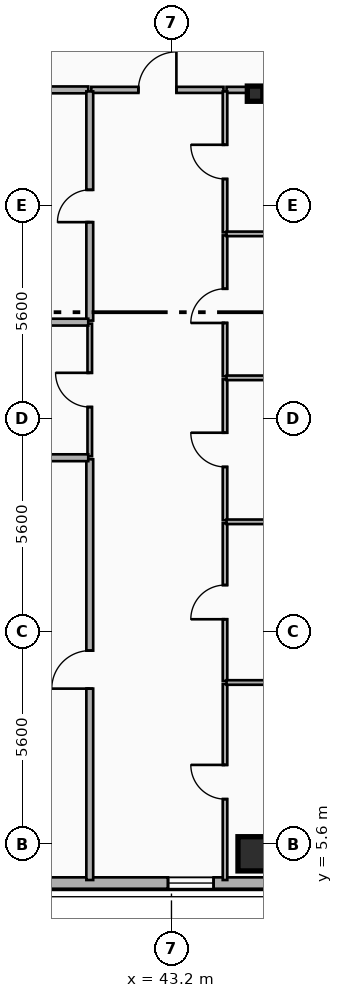
"""IFC4 building model, lengths in metres.
Left out: names, types, materials, properties, quantities, classifications, styles, units other than length and angle.
Written with IfcOpenShell. Run it as: python <this file> out.ifc"""

import sys

from ifc_helpers import new_model, si_unit, direction, frame, frame_2d, origin, origin_2d, place, context, subcontext, project, spatial, rectangle, i_section, extrude, element, fill, save


model = new_model("IFC4")
c1 = context("Model", 3, precision=1e-05, world=origin(), true_north=direction((0.0, 1.0)))
c2 = subcontext(c1, "Body", "Model", "MODEL_VIEW")
j1 = project(units=[si_unit("LENGTHUNIT", "METRE"), si_unit("PLANEANGLEUNIT", "RADIAN")], contexts=[c1])
p1 = place(None, origin())
s1 = spatial("IfcSite", under=j1, at=p1, CompositionType="ELEMENT")
p2 = place(p1, origin())
s2 = spatial("IfcBuilding", under=s1, at=p2, CompositionType="ELEMENT")
p3 = place(p2, frame((0.0, 0.0, 229.2)))
s3 = spatial("IfcBuildingStorey", under=s2, at=p3, CompositionType="ELEMENT", Elevation=229.2)
p4 = place(p3, frame((45.4, 25.35, 0.0), z_axis=(0.0, 0.0, 1.0), x_axis=(1.0, 0.0, 0.0)))
e1 = element("IfcColumn", 1, at=p4, inside=s3, PredefinedType="COLUMN", context=c2, shape_type="SweptSolid", body=[
    extrude(i_section(OverallWidth=0.408, OverallDepth=0.4, WebThickness=0.025, FlangeThickness=0.039, FilletRadius=0.015, at=origin_2d()), origin(), (0.0, 0.0, 1.0), 3.6),
])
p5 = place(p3, frame((45.4, 5.458, 0.0), z_axis=(0.0, -0.090298253426, 0.995914768154), x_axis=(1.0, 0.0, 0.0)))
e2 = element("IfcColumn", 2, at=p5, inside=s3, PredefinedType="COLUMN", context=c2, shape_type="SweptSolid", body=[
    extrude(rectangle(XDim=0.9, YDim=0.9, at=origin_2d()), origin(), (0.0, 0.0, 1.0), 3.615),
])
p6 = place(p3, frame((48.0, 4.58, 0.0), z_axis=(0.0, 0.0, 1.0), x_axis=(-1.0, 0.0, 0.0)))
e3 = element("IfcWall", 3, at=p6, inside=s3, PredefinedType="SOLIDWALL", context=c2, shape_type="SweptSolid", body=[
    extrude(rectangle(XDim=38.4, YDim=0.3, at=frame_2d((19.2, 0.0))), origin(), (0.0, 0.0, 1.0), 3.34),
])
p7 = place(p6, frame((33.902, 0.0, 1.05)))
e4 = element("IfcOpeningElement", 4, at=p7, cuts=e3, PredefinedType="OPENING", context=c2, shape_type="SweptSolid", body=[
    extrude(rectangle(XDim=1.2, YDim=1.5, at=frame_2d((0.6, 0.75))), frame((0.0, 0.16, 0.0), z_axis=(0.0, -1.0, 0.0), x_axis=(1.0, 0.0, 0.0)), (0.0, 0.0, 1.0), 0.32),
])
p8 = place(p6, frame((29.45, 0.0, 0.48)))
e5 = element("IfcOpeningElement", 5, at=p8, cuts=e3, PredefinedType="OPENING", context=c2, shape_type="SweptSolid", body=[
    extrude(rectangle(XDim=1.1, YDim=1.05, at=frame_2d((0.55, 0.525))), frame((0.0, 0.16, 0.0), z_axis=(0.0, -1.0, 0.0), x_axis=(1.0, 0.0, 0.0)), (0.0, 0.0, 1.0), 0.32),
])
p9 = place(p6, frame((36.589, 0.0, 0.75)))
e6 = element("IfcOpeningElement", 6, at=p9, cuts=e3, PredefinedType="OPENING", context=c2, shape_type="SweptSolid", body=[
    extrude(rectangle(XDim=1.4, YDim=1.8, at=frame_2d((0.7, 0.9))), frame((0.0, 0.16, 0.0), z_axis=(0.0, -1.0, 0.0), x_axis=(1.0, 0.0, 0.0)), (0.0, 0.0, 1.0), 0.32),
])
p10 = place(p6, frame((15.576, 0.0, 0.65)))
e7 = element("IfcOpeningElement", 7, at=p10, cuts=e3, PredefinedType="OPENING", context=c2, shape_type="SweptSolid", body=[
    extrude(rectangle(XDim=2.0, YDim=2.2, at=frame_2d((1.0, 1.1))), frame((0.0, 0.16, 0.0), z_axis=(0.0, -1.0, 0.0), x_axis=(1.0, 0.0, 0.0)), (0.0, 0.0, 1.0), 0.32),
])
p11 = place(p6, frame((22.776, 0.0, 0.65)))
e8 = element("IfcOpeningElement", 8, at=p11, cuts=e3, PredefinedType="OPENING", context=c2, shape_type="SweptSolid", body=[
    extrude(rectangle(XDim=2.0, YDim=2.2, at=frame_2d((1.0, 1.1))), frame((0.0, 0.16, 0.0), z_axis=(0.0, -1.0, 0.0), x_axis=(1.0, 0.0, 0.0)), (0.0, 0.0, 1.0), 0.32),
])
p12 = place(p6, frame((12.399, 0.0, 0.75)))
e9 = element("IfcOpeningElement", 9, at=p12, cuts=e3, PredefinedType="OPENING", context=c2, shape_type="SweptSolid", body=[
    extrude(rectangle(XDim=1.6, YDim=1.95, at=frame_2d((0.8, 0.975))), frame((0.0, 0.16, 0.0), z_axis=(0.0, -1.0, 0.0), x_axis=(1.0, 0.0, 0.0)), (0.0, 0.0, 1.0), 0.32),
])
p13 = place(p6, frame((3.691, 0.0, 0.48)))
e10 = element("IfcOpeningElement", 10, at=p13, cuts=e3, PredefinedType="OPENING", context=c2, shape_type="SweptSolid", body=[
    extrude(rectangle(XDim=1.2, YDim=1.5, at=frame_2d((0.6, 0.75))), frame((0.0, 0.16, 0.0), z_axis=(0.0, -1.0, 0.0), x_axis=(1.0, 0.0, 0.0)), (0.0, 0.0, 1.0), 0.32),
])
p14 = place(p6, frame((8.25, 0.0, 1.68)))
e11 = element("IfcOpeningElement", 11, at=p14, cuts=e3, PredefinedType="OPENING", context=c2, shape_type="SweptSolid", body=[
    extrude(rectangle(XDim=1.1, YDim=1.05, at=frame_2d((0.55, 0.525))), frame((0.0, 0.16, 0.0), z_axis=(0.0, -1.0, 0.0), x_axis=(1.0, 0.0, 0.0)), (0.0, 0.0, 1.0), 0.32),
])
p15 = place(p6, frame((0.411, 0.0, 0.75)))
e12 = element("IfcOpeningElement", 12, at=p15, cuts=e3, PredefinedType="OPENING", context=c2, shape_type="SweptSolid", body=[
    extrude(rectangle(XDim=1.4, YDim=1.8, at=frame_2d((0.7, 0.9))), frame((0.0, 0.16, 0.0), z_axis=(0.0, -1.0, 0.0), x_axis=(1.0, 0.0, 0.0)), (0.0, 0.0, 1.0), 0.32),
])
p16 = place(p3, frame((41.09, 25.45, 0.0), z_axis=(0.0, 0.0, 1.0), x_axis=(1.0, 0.0, 0.0)))
e13 = element("IfcWall", 13, at=p16, inside=s3, PredefinedType="PARTITIONING", context=c2, shape_type="SweptSolid", body=[
    extrude(rectangle(XDim=3.479, YDim=0.16, at=frame_2d((1.74, 0.0))), origin(), (0.0, 0.0, 1.0), 3.34),
])
p17 = place(p16, frame((1.24, 0.0, 0.0)))
e14 = element("IfcOpeningElement", 14, at=p17, cuts=e13, PredefinedType="OPENING", context=c2, shape_type="SweptSolid", body=[
    extrude(rectangle(XDim=1.0, YDim=2.15, at=frame_2d((0.5, 1.075))), frame((0.0, 0.09, 0.0), z_axis=(0.0, -1.0, 0.0), x_axis=(1.0, 0.0, 0.0)), (0.0, 0.0, 1.0), 0.18),
])
p18 = place(p3, frame((38.39, 25.45, 0.0), z_axis=(0.0, 0.0, 1.0), x_axis=(1.0, 0.0, 0.0)))
e15 = element("IfcWall", 15, at=p18, inside=s3, PredefinedType="PLUMBINGWALL", context=c2, shape_type="SweptSolid", body=[
    extrude(rectangle(XDim=2.62, YDim=0.18, at=frame_2d((1.31, 0.0))), origin(), (0.0, 0.0, 1.0), 3.34),
])
p19 = place(p3, frame((44.649, 25.45, 0.0), z_axis=(0.0, 0.0, 1.0), x_axis=(1.0, 0.0, 0.0)))
e16 = element("IfcWall", 16, at=p19, inside=s3, PredefinedType="PARTITIONING", context=c2, shape_type="SweptSolid", body=[
    extrude(rectangle(XDim=7.291, YDim=0.16, at=frame_2d((3.646, 0.0))), origin(), (0.0, 0.0, 1.0), 2.52),
])
p20 = place(p3, frame((41.05, 4.66, 0.0), z_axis=(0.0, 0.0, 1.0), x_axis=(0.0, 1.0, 0.0)))
e17 = element("IfcWall", 17, at=p20, inside=s3, PredefinedType="PLUMBINGWALL", context=c2, shape_type="SweptSolid", body=[
    extrude(rectangle(XDim=11.071, YDim=0.18, at=frame_2d((5.536, 0.0))), origin(), (0.0, 0.0, 1.0), 2.92),
])
p21 = place(p20, frame((5.035, 0.0, 0.0)))
e18 = element("IfcOpeningElement", 18, at=p21, cuts=e17, PredefinedType="OPENING", context=c2, shape_type="SweptSolid", body=[
    extrude(rectangle(XDim=1.0, YDim=2.15, at=frame_2d((0.5, 1.075))), frame((0.0, 0.1, 0.0), z_axis=(0.0, -1.0, 0.0), x_axis=(1.0, 0.0, 0.0)), (0.0, 0.0, 1.0), 0.2),
])
p22 = place(p3, frame((41.05, 15.811, 0.0), z_axis=(0.0, 0.0, 1.0), x_axis=(0.0, 1.0, 0.0)))
e19 = element("IfcWall", 19, at=p22, inside=s3, PredefinedType="PARTITIONING", context=c2, shape_type="SweptSolid", body=[
    extrude(rectangle(XDim=3.488, YDim=0.12, at=frame_2d((1.744, 0.0))), origin(), (0.0, 0.0, 1.0), 2.92),
])
p23 = place(p22, frame((1.294, 0.0, 0.0)))
e20 = element("IfcOpeningElement", 20, at=p23, cuts=e19, PredefinedType="OPENING", context=c2, shape_type="SweptSolid", body=[
    extrude(rectangle(XDim=0.9, YDim=2.1, at=frame_2d((0.45, 1.05))), frame((0.0, 0.07, 0.0), z_axis=(0.0, -1.0, 0.0), x_axis=(1.0, 0.0, 0.0)), (0.0, 0.0, 1.0), 0.14),
])
p24 = place(p3, frame((41.05, 19.379, 0.0), z_axis=(0.0, 0.0, 1.0), x_axis=(0.0, 1.0, 0.0)))
e21 = element("IfcWall", 21, at=p24, inside=s3, PredefinedType="PLUMBINGWALL", context=c2, shape_type="SweptSolid", body=[
    extrude(rectangle(XDim=6.031, YDim=0.18, at=frame_2d((3.016, 0.0))), origin(), (0.0, 0.0, 1.0), 2.92),
])
p25 = place(p24, frame((2.591, 0.0, 0.0)))
e22 = element("IfcOpeningElement", 22, at=p25, cuts=e21, PredefinedType="OPENING", context=c2, shape_type="SweptSolid", body=[
    extrude(rectangle(XDim=0.85, YDim=2.1, at=frame_2d((0.425, 1.05))), frame((0.0, 0.1, 0.0), z_axis=(0.0, -1.0, 0.0), x_axis=(1.0, 0.0, 0.0)), (0.0, 0.0, 1.0), 0.2),
])
p26 = place(p3, frame((44.609, 4.66, 0.0), z_axis=(0.0, 0.0, 1.0), x_axis=(0.0, 1.0, 0.0)))
e23 = element("IfcWall", 23, at=p26, inside=s3, PredefinedType="PARTITIONING", context=c2, shape_type="SweptSolid", body=[
    extrude(rectangle(XDim=5.157, YDim=0.12, at=frame_2d((2.579, 0.0))), origin(), (0.0, 0.0, 1.0), 2.92),
])
p27 = place(p26, frame((2.128, 0.0, 0.0)))
e24 = element("IfcOpeningElement", 24, at=p27, cuts=e23, PredefinedType="OPENING", context=c2, shape_type="SweptSolid", body=[
    extrude(rectangle(XDim=0.9, YDim=2.1, at=frame_2d((0.45, 1.05))), frame((0.0, 0.07, 0.0), z_axis=(0.0, -1.0, 0.0), x_axis=(1.0, 0.0, 0.0)), (0.0, 0.0, 1.0), 0.14),
])
p28 = place(p3, frame((44.609, 9.897, 0.0), z_axis=(0.0, 0.0, 1.0), x_axis=(0.0, 1.0, 0.0)))
e25 = element("IfcWall", 25, at=p28, inside=s3, PredefinedType="PARTITIONING", context=c2, shape_type="SweptSolid", body=[
    extrude(rectangle(XDim=4.148, YDim=0.12, at=frame_2d((2.074, 0.0))), origin(), (0.0, 0.0, 1.0), 2.93),
])
p29 = place(p28, frame((1.624, 0.0, 0.0)))
e26 = element("IfcOpeningElement", 26, at=p29, cuts=e25, PredefinedType="OPENING", context=c2, shape_type="SweptSolid", body=[
    extrude(rectangle(XDim=0.9, YDim=2.1, at=frame_2d((0.45, 1.05))), frame((0.0, 0.07, 0.0), z_axis=(0.0, -1.0, 0.0), x_axis=(1.0, 0.0, 0.0)), (0.0, 0.0, 1.0), 0.14),
])
p30 = place(p3, frame((44.609, 14.125, 0.0), z_axis=(0.0, 0.0, 1.0), x_axis=(0.0, 1.0, 0.0)))
e27 = element("IfcWall", 27, at=p30, inside=s3, PredefinedType="PARTITIONING", context=c2, shape_type="SweptSolid", body=[
    extrude(rectangle(XDim=3.708, YDim=0.12, at=frame_2d((1.854, 0.0))), origin(), (0.0, 0.0, 1.0), 2.92),
])
p31 = place(p30, frame((1.404, 0.0, 0.0)))
e28 = element("IfcOpeningElement", 28, at=p31, cuts=e27, PredefinedType="OPENING", context=c2, shape_type="SweptSolid", body=[
    extrude(rectangle(XDim=0.9, YDim=2.1, at=frame_2d((0.45, 1.05))), frame((0.0, 0.07, 0.0), z_axis=(0.0, -1.0, 0.0), x_axis=(1.0, 0.0, 0.0)), (0.0, 0.0, 1.0), 0.14),
])
p32 = place(p3, frame((44.609, 17.913, 0.0), z_axis=(0.0, 0.0, 1.0), x_axis=(0.0, 1.0, 0.0)))
e29 = element("IfcWall", 29, at=p32, inside=s3, PredefinedType="PARTITIONING", context=c2, shape_type="SweptSolid", body=[
    extrude(rectangle(XDim=3.708, YDim=0.12, at=frame_2d((1.854, 0.0))), origin(), (0.0, 0.0, 1.0), 2.93),
])
p33 = place(p32, frame((1.404, 0.0, 0.0)))
e30 = element("IfcOpeningElement", 30, at=p33, cuts=e29, PredefinedType="OPENING", context=c2, shape_type="SweptSolid", body=[
    extrude(rectangle(XDim=0.9, YDim=2.1, at=frame_2d((0.45, 1.05))), frame((0.0, 0.07, 0.0), z_axis=(0.0, -1.0, 0.0), x_axis=(1.0, 0.0, 0.0)), (0.0, 0.0, 1.0), 0.14),
])
p34 = place(p3, frame((44.609, 21.701, 0.0), z_axis=(0.0, 0.0, 1.0), x_axis=(0.0, 1.0, 0.0)))
e31 = element("IfcWall", 31, at=p34, inside=s3, PredefinedType="PARTITIONING", context=c2, shape_type="SweptSolid", body=[
    extrude(rectangle(XDim=3.709, YDim=0.12, at=frame_2d((1.854, 0.0))), origin(), (0.0, 0.0, 1.0), 2.92),
])
p35 = place(p34, frame((1.405, 0.0, 0.0)))
e32 = element("IfcOpeningElement", 32, at=p35, cuts=e31, PredefinedType="OPENING", context=c2, shape_type="SweptSolid", body=[
    extrude(rectangle(XDim=0.9, YDim=2.1, at=frame_2d((0.45, 1.05))), frame((0.0, 0.07, 0.0), z_axis=(0.0, -1.0, 0.0), x_axis=(1.0, 0.0, 0.0)), (0.0, 0.0, 1.0), 0.14),
])
p36 = place(p3, frame((38.39, 15.771, 0.0), z_axis=(0.0, 0.0, 1.0), x_axis=(1.0, 0.0, 0.0)))
e33 = element("IfcWall", 33, at=p36, inside=s3, PredefinedType="PLUMBINGWALL", context=c2, shape_type="SweptSolid", body=[
    extrude(rectangle(XDim=2.62, YDim=0.18, at=frame_2d((1.31, 0.0))), origin(), (0.0, 0.0, 1.0), 2.92),
])
p37 = place(p3, frame((38.39, 19.339, 0.0), z_axis=(0.0, 0.0, 1.0), x_axis=(1.0, 0.0, 0.0)))
e34 = element("IfcWall", 34, at=p37, inside=s3, PredefinedType="PLUMBINGWALL", context=c2, shape_type="SweptSolid", body=[
    extrude(rectangle(XDim=2.62, YDim=0.18, at=frame_2d((1.31, 0.0))), origin(), (0.0, 0.0, 1.0), 2.93),
])
for number, where, z_axis, x_axis in (
    (35, (44.649, 9.857, 0.0), (0.0, 0.0, 1.0), (1.0, 0.0, 0.0)),
    (36, (44.649, 14.085, 0.0), (0.0, 0.0, 1.0), (1.0, 0.0, 0.0)),
    (37, (44.649, 17.873, 0.0), (0.0, 0.0, 1.0), (1.0, 0.0, 0.0)),
    (38, (44.649, 21.661, 0.0), (0.0, 0.0, 1.0), (1.0, 0.0, 0.0)),
):
    element("IfcWall", number, at=place(p3, frame(where, z_axis=z_axis, x_axis=x_axis)), inside=s3, PredefinedType="PARTITIONING", context=c2, shape_type="SweptSolid", body=[
        extrude(rectangle(XDim=7.291, YDim=0.12, at=frame_2d((3.646, 0.0))), origin(), (0.0, 0.0, 1.0), 2.52),
    ])
p38 = place(p13, origin())
e39 = element("IfcWindow", 39, at=p38, inside=s3, PartitioningType="SINGLE_PANEL", PredefinedType="WINDOW", context=c2, shape_type="SweptSolid", body=[
    extrude(rectangle(XDim=1.2, YDim=1.5, at=frame_2d((0.6, 0.75))), frame((0.0, 0.03, 0.0), z_axis=(0.0, -1.0, 0.0), x_axis=(1.0, 0.0, 0.0)), (0.0, 0.0, 1.0), 0.06),
])
fill(e10, e39)
p39 = place(p17, origin())
e40 = element("IfcDoor", 40, at=p39, inside=s3, OperationType="SINGLE_SWING_RIGHT", PredefinedType="DOOR", context=c2, shape_type="SweptSolid", body=[
    extrude(rectangle(XDim=1.0, YDim=2.15, at=frame_2d((0.5, 1.075))), frame((0.0, 0.025, 0.0), z_axis=(0.0, -1.0, 0.0), x_axis=(1.0, 0.0, 0.0)), (0.0, 0.0, 1.0), 0.05),
])
fill(e14, e40)
p40 = place(p21, origin())
e41 = element("IfcDoor", 41, at=p40, inside=s3, OperationType="SINGLE_SWING_LEFT", PredefinedType="DOOR", context=c2, shape_type="SweptSolid", body=[
    extrude(rectangle(XDim=1.0, YDim=2.15, at=frame_2d((0.5, 1.075))), frame((0.0, 0.025, 0.0), z_axis=(0.0, -1.0, 0.0), x_axis=(1.0, 0.0, 0.0)), (0.0, 0.0, 1.0), 0.05),
])
fill(e18, e41)
p41 = place(p23, origin())
e42 = element("IfcDoor", 42, at=p41, inside=s3, OperationType="SINGLE_SWING_RIGHT", PredefinedType="DOOR", context=c2, shape_type="SweptSolid", body=[
    extrude(rectangle(XDim=0.9, YDim=2.1, at=frame_2d((0.45, 1.05))), frame((0.0, 0.025, 0.0), z_axis=(0.0, -1.0, 0.0), x_axis=(1.0, 0.0, 0.0)), (0.0, 0.0, 1.0), 0.05),
])
fill(e20, e42)
p42 = place(p25, origin())
e43 = element("IfcDoor", 43, at=p42, inside=s3, OperationType="SINGLE_SWING_LEFT", PredefinedType="DOOR", context=c2, shape_type="SweptSolid", body=[
    extrude(rectangle(XDim=0.85, YDim=2.1, at=frame_2d((0.425, 1.05))), frame((0.0, 0.025, 0.0), z_axis=(0.0, -1.0, 0.0), x_axis=(1.0, 0.0, 0.0)), (0.0, 0.0, 1.0), 0.05),
])
fill(e22, e43)
p43 = place(p27, origin())
e44 = element("IfcDoor", 44, at=p43, inside=s3, OperationType="SINGLE_SWING_RIGHT", PredefinedType="DOOR", context=c2, shape_type="SweptSolid", body=[
    extrude(rectangle(XDim=0.9, YDim=2.1, at=frame_2d((0.45, 1.05))), frame((0.0, 0.025, 0.0), z_axis=(0.0, -1.0, 0.0), x_axis=(1.0, 0.0, 0.0)), (0.0, 0.0, 1.0), 0.05),
])
fill(e24, e44)
p44 = place(p29, origin())
e45 = element("IfcDoor", 45, at=p44, inside=s3, OperationType="SINGLE_SWING_LEFT", PredefinedType="DOOR", context=c2, shape_type="SweptSolid", body=[
    extrude(rectangle(XDim=0.9, YDim=2.1, at=frame_2d((0.45, 1.05))), frame((0.0, 0.025, 0.0), z_axis=(0.0, -1.0, 0.0), x_axis=(1.0, 0.0, 0.0)), (0.0, 0.0, 1.0), 0.05),
])
fill(e26, e45)
p45 = place(p31, origin())
e46 = element("IfcDoor", 46, at=p45, inside=s3, OperationType="SINGLE_SWING_RIGHT", PredefinedType="DOOR", context=c2, shape_type="SweptSolid", body=[
    extrude(rectangle(XDim=0.9, YDim=2.1, at=frame_2d((0.45, 1.05))), frame((0.0, 0.025, 0.0), z_axis=(0.0, -1.0, 0.0), x_axis=(1.0, 0.0, 0.0)), (0.0, 0.0, 1.0), 0.05),
])
fill(e28, e46)
p46 = place(p33, origin())
e47 = element("IfcDoor", 47, at=p46, inside=s3, OperationType="SINGLE_SWING_LEFT", PredefinedType="DOOR", context=c2, shape_type="SweptSolid", body=[
    extrude(rectangle(XDim=0.9, YDim=2.1, at=frame_2d((0.45, 1.05))), frame((0.0, 0.025, 0.0), z_axis=(0.0, -1.0, 0.0), x_axis=(1.0, 0.0, 0.0)), (0.0, 0.0, 1.0), 0.05),
])
fill(e30, e47)
p47 = place(p35, origin())
e48 = element("IfcDoor", 48, at=p47, inside=s3, OperationType="SINGLE_SWING_RIGHT", PredefinedType="DOOR", context=c2, shape_type="SweptSolid", body=[
    extrude(rectangle(XDim=0.9, YDim=2.1, at=frame_2d((0.45, 1.05))), frame((0.0, 0.025, 0.0), z_axis=(0.0, -1.0, 0.0), x_axis=(1.0, 0.0, 0.0)), (0.0, 0.0, 1.0), 0.05),
])
fill(e32, e48)
save(model, sys.argv[1])
